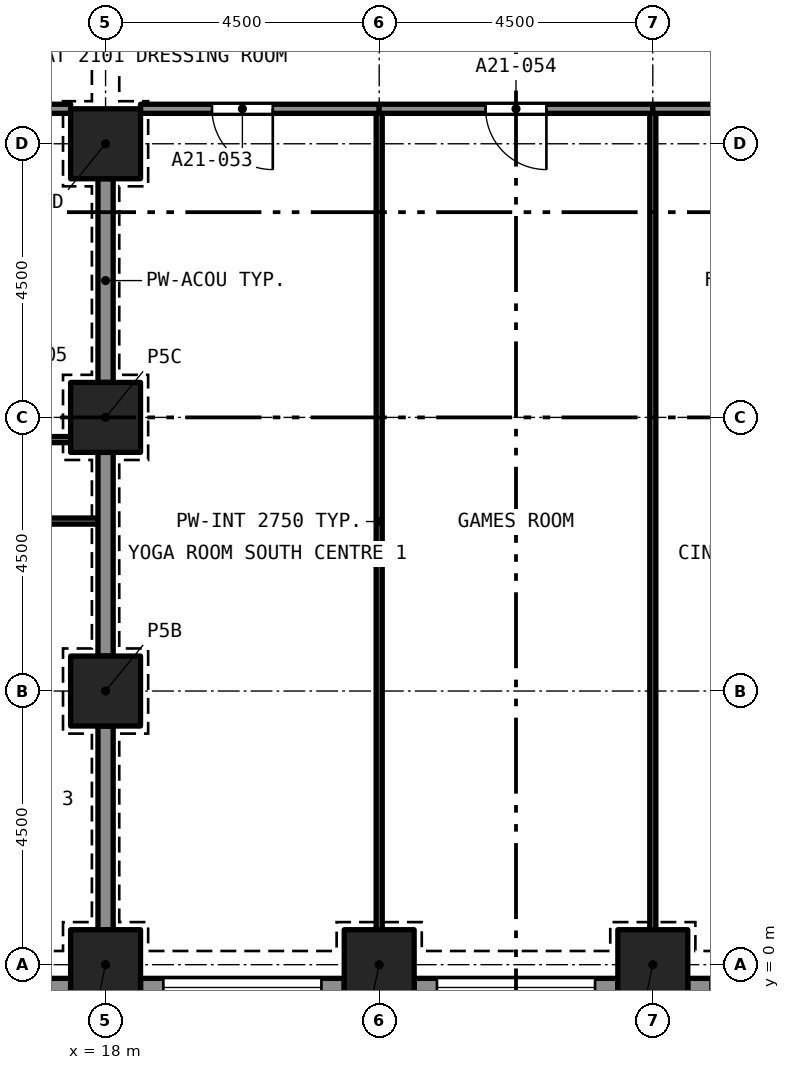
"""IFC4 building model, lengths in metres.
Left out: names, types, materials, properties, quantities, classifications, styles, units other than length and angle.
Written with IfcOpenShell. Run it as: python <this file> out.ifc"""

import sys

from ifc_helpers import new_model, si_unit, direction, frame, frame_2d, origin, origin_2d, place, context, subcontext, project, spatial, rectangle, extrude, element, fill, save


model = new_model("IFC4")
c1 = context("Model", 3, precision=1e-05, world=origin(), true_north=direction((0.0, 1.0)))
c2 = subcontext(c1, "Body", "Model", "MODEL_VIEW")
j1 = project(units=[si_unit("LENGTHUNIT", "METRE"), si_unit("PLANEANGLEUNIT", "RADIAN")], contexts=[c1])
p1 = place(None, origin())
s1 = spatial("IfcSite", under=j1, at=p1, CompositionType="ELEMENT")
p2 = place(p1, origin())
s2 = spatial("IfcBuilding", under=s1, at=p2, CompositionType="ELEMENT")
p3 = place(p2, frame((0.0, 0.0, 80.0)))
s3 = spatial("IfcBuildingStorey", under=s2, at=p3, CompositionType="ELEMENT", Elevation=80.0)
for number, where, z_axis, x_axis in (
    (1, (18.0, 0.0, 0.0), (0.0, 0.0, 1.0), (1.0, 0.0, 0.0)),
    (2, (22.5, 0.0, 0.0), (0.0, 0.0, 1.0), (1.0, 0.0, 0.0)),
    (3, (27.0, 0.0, 0.0), (0.0, 0.0, 1.0), (1.0, 0.0, 0.0)),
    (4, (18.0, 4.5, 0.0), (0.0, 0.0, 1.0), (1.0, 0.0, 0.0)),
    (5, (18.0, 9.0, 0.0), (0.0, 0.0, 1.0), (1.0, 0.0, 0.0)),
    (6, (18.0, 13.5, 0.0), (0.0, 0.0, 1.0), (1.0, 0.0, 0.0)),
):
    element("IfcColumn", number, at=place(p3, frame(where, z_axis=z_axis, x_axis=x_axis)), inside=s3, PredefinedType="COLUMN", context=c2, shape_type="SweptSolid", body=[
        extrude(rectangle(XDim=1.15, YDim=1.15, at=origin_2d()), origin(), (0.0, 0.0, 1.0), 3.2),
    ])
p4 = place(p3, frame((17.425, -0.375, 0.0), z_axis=(0.0, 0.0, 1.0), x_axis=(-1.0, 0.0, 0.0)))
e7 = element("IfcWall", 7, at=p4, inside=s3, PredefinedType="SOLIDWALL", context=c2, shape_type="SweptSolid", body=[
    extrude(rectangle(XDim=3.35, YDim=0.3, at=frame_2d((1.675, 0.0))), origin(), (0.0, 0.0, 1.0), 3.2),
])
p5 = place(p4, frame((0.375, 0.0, 0.45)))
e8 = element("IfcOpeningElement", 8, at=p5, cuts=e7, PredefinedType="OPENING", context=c2, shape_type="SweptSolid", body=[
    extrude(rectangle(XDim=2.6, YDim=1.95, at=frame_2d((1.3, 0.975))), frame((0.0, 0.16, 0.0), z_axis=(0.0, -1.0, 0.0), x_axis=(1.0, 0.0, 0.0)), (0.0, 0.0, 1.0), 0.32),
])
p6 = place(p3, frame((21.925, -0.375, 0.0), z_axis=(0.0, 0.0, 1.0), x_axis=(-1.0, 0.0, 0.0)))
e9 = element("IfcWall", 9, at=p6, inside=s3, PredefinedType="SOLIDWALL", context=c2, shape_type="SweptSolid", body=[
    extrude(rectangle(XDim=3.35, YDim=0.3, at=frame_2d((1.675, 0.0))), origin(), (0.0, 0.0, 1.0), 3.2),
])
p7 = place(p6, frame((0.375, 0.0, 0.45)))
e10 = element("IfcOpeningElement", 10, at=p7, cuts=e9, PredefinedType="OPENING", context=c2, shape_type="SweptSolid", body=[
    extrude(rectangle(XDim=2.6, YDim=1.95, at=frame_2d((1.3, 0.975))), frame((0.0, 0.16, 0.0), z_axis=(0.0, -1.0, 0.0), x_axis=(1.0, 0.0, 0.0)), (0.0, 0.0, 1.0), 0.32),
])
p8 = place(p3, frame((26.425, -0.375, 0.0), z_axis=(0.0, 0.0, 1.0), x_axis=(-1.0, 0.0, 0.0)))
e11 = element("IfcWall", 11, at=p8, inside=s3, PredefinedType="SOLIDWALL", context=c2, shape_type="SweptSolid", body=[
    extrude(rectangle(XDim=3.35, YDim=0.3, at=frame_2d((1.675, 0.0))), origin(), (0.0, 0.0, 1.0), 3.2),
])
p9 = place(p8, frame((0.375, 0.0, 0.45)))
e12 = element("IfcOpeningElement", 12, at=p9, cuts=e11, PredefinedType="OPENING", context=c2, shape_type="SweptSolid", body=[
    extrude(rectangle(XDim=2.6, YDim=1.95, at=frame_2d((1.3, 0.975))), frame((0.0, 0.16, 0.0), z_axis=(0.0, -1.0, 0.0), x_axis=(1.0, 0.0, 0.0)), (0.0, 0.0, 1.0), 0.32),
])
p10 = place(p3, frame((30.925, -0.375, 0.0), z_axis=(0.0, 0.0, 1.0), x_axis=(-1.0, 0.0, 0.0)))
e13 = element("IfcWall", 13, at=p10, inside=s3, PredefinedType="SOLIDWALL", context=c2, shape_type="SweptSolid", body=[
    extrude(rectangle(XDim=3.35, YDim=0.3, at=frame_2d((1.675, 0.0))), origin(), (0.0, 0.0, 1.0), 3.2),
])
p11 = place(p10, frame((0.375, 0.0, 0.45)))
e14 = element("IfcOpeningElement", 14, at=p11, cuts=e13, PredefinedType="OPENING", context=c2, shape_type="SweptSolid", body=[
    extrude(rectangle(XDim=2.6, YDim=1.95, at=frame_2d((1.3, 0.975))), frame((0.0, 0.16, 0.0), z_axis=(0.0, -1.0, 0.0), x_axis=(1.0, 0.0, 0.0)), (0.0, 0.0, 1.0), 0.32),
])
p12 = place(p3, frame((11.85, 14.075, 0.0), z_axis=(0.0, 0.0, 1.0), x_axis=(1.0, 0.0, 0.0)))
e15 = element("IfcWall", 15, at=p12, inside=s3, PredefinedType="PARTITIONING", context=c2, shape_type="SweptSolid", body=[
    extrude(rectangle(XDim=5.575, YDim=0.15, at=frame_2d((2.788, 0.0))), origin(), (0.0, 0.0, 1.0), 2.9),
])
p13 = place(p3, frame((17.875, 7.295, 0.0), z_axis=(0.0, 0.0, 1.0), x_axis=(-1.0, 0.0, 0.0)))
e16 = element("IfcWall", 16, at=p13, inside=s3, PredefinedType="PARTITIONING", context=c2, shape_type="SweptSolid", body=[
    extrude(rectangle(XDim=4.375, YDim=0.1, at=frame_2d((2.188, 0.0))), origin(), (0.0, 0.0, 1.0), 2.9),
])
p14 = place(p13, frame((1.675, 0.0, 0.0)))
e17 = element("IfcOpeningElement", 17, at=p14, cuts=e16, PredefinedType="OPENING", context=c2, shape_type="SweptSolid", body=[
    extrude(rectangle(XDim=0.9, YDim=2.1, at=frame_2d((0.45, 1.05))), frame((0.0, 0.06, 0.0), z_axis=(0.0, -1.0, 0.0), x_axis=(1.0, 0.0, 0.0)), (0.0, 0.0, 1.0), 0.12),
])
for number, where, z_axis, x_axis in (
    (18, (18.0, 5.075, 0.0), (0.0, 0.0, 1.0), (0.0, 1.0, 0.0)),
    (19, (18.0, 0.575, 0.0), (0.0, 0.0, 1.0), (0.0, 1.0, 0.0)),
):
    element("IfcWall", number, at=place(p3, frame(where, z_axis=z_axis, x_axis=x_axis)), inside=s3, PredefinedType="PARTITIONING", context=c2, shape_type="SweptSolid", body=[
        extrude(rectangle(XDim=3.35, YDim=0.25, at=frame_2d((1.675, 0.0))), origin(), (0.0, 0.0, 1.0), 2.38),
    ])
p15 = place(p3, frame((15.402, 8.635, 0.0), z_axis=(0.0, 0.0, 1.0), x_axis=(1.0, 0.0, 0.0)))
e20 = element("IfcWall", 20, at=p15, inside=s3, PredefinedType="PARTITIONING", context=c2, shape_type="SweptSolid", body=[
    extrude(rectangle(XDim=2.023, YDim=0.1, at=frame_2d((1.012, 0.0))), origin(), (0.0, 0.0, 1.0), 2.9),
])
p16 = place(p15, frame((0.899, 0.0, 0.0)))
e21 = element("IfcOpeningElement", 21, at=p16, cuts=e20, PredefinedType="OPENING", context=c2, shape_type="SweptSolid", body=[
    extrude(rectangle(XDim=0.8, YDim=2.1, at=frame_2d((0.4, 1.05))), frame((0.0, 0.06, 0.0), z_axis=(0.0, -1.0, 0.0), x_axis=(1.0, 0.0, 0.0)), (0.0, 0.0, 1.0), 0.12),
])
p17 = place(p3, frame((18.0, 9.575, 0.0), z_axis=(0.0, 0.0, 1.0), x_axis=(0.0, 1.0, 0.0)))
e22 = element("IfcWall", 22, at=p17, inside=s3, PredefinedType="PARTITIONING", context=c2, shape_type="SweptSolid", body=[
    extrude(rectangle(XDim=3.35, YDim=0.25, at=frame_2d((1.675, 0.0))), origin(), (0.0, 0.0, 1.0), 2.38),
])
p18 = place(p3, frame((22.5, 0.575, 0.0), z_axis=(0.0, 0.0, 1.0), x_axis=(0.0, 1.0, 0.0)))
e23 = element("IfcWall", 23, at=p18, inside=s3, PredefinedType="PARTITIONING", context=c2, shape_type="SweptSolid", body=[
    extrude(rectangle(XDim=13.425, YDim=0.1, at=frame_2d((6.712, 0.0))), origin(), (0.0, 0.0, 1.0), 2.75),
])
p19 = place(p3, frame((22.5, 14.075, 0.0), z_axis=(0.0, 0.0, 1.0), x_axis=(-1.0, 0.0, 0.0)))
e24 = element("IfcWall", 24, at=p19, inside=s3, PredefinedType="PARTITIONING", context=c2, shape_type="SweptSolid", body=[
    extrude(rectangle(XDim=3.925, YDim=0.15, at=frame_2d((1.962, 0.0))), origin(), (0.0, 0.0, 1.0), 2.75),
])
p20 = place(p19, frame((1.75, 0.0, 0.0)))
e25 = element("IfcOpeningElement", 25, at=p20, cuts=e24, PredefinedType="OPENING", context=c2, shape_type="SweptSolid", body=[
    extrude(rectangle(XDim=1.0, YDim=2.1, at=frame_2d((0.5, 1.05))), frame((0.0, 0.085, 0.0), z_axis=(0.0, -1.0, 0.0), x_axis=(1.0, 0.0, 0.0)), (0.0, 0.0, 1.0), 0.17),
])
p21 = place(p3, frame((27.0, 0.575, 0.0), z_axis=(0.0, 0.0, 1.0), x_axis=(0.0, 1.0, 0.0)))
e26 = element("IfcWall", 26, at=p21, inside=s3, PredefinedType="PARTITIONING", context=c2, shape_type="SweptSolid", body=[
    extrude(rectangle(XDim=13.425, YDim=0.1, at=frame_2d((6.712, 0.0))), origin(), (0.0, 0.0, 1.0), 2.75),
])
p22 = place(p3, frame((27.0, 14.075, 0.0), z_axis=(0.0, 0.0, 1.0), x_axis=(-1.0, 0.0, 0.0)))
e27 = element("IfcWall", 27, at=p22, inside=s3, PredefinedType="PARTITIONING", context=c2, shape_type="SweptSolid", body=[
    extrude(rectangle(XDim=4.5, YDim=0.15, at=frame_2d((2.25, 0.0))), origin(), (0.0, 0.0, 1.0), 2.75),
])
p23 = place(p22, frame((1.75, 0.0, 0.0)))
e28 = element("IfcOpeningElement", 28, at=p23, cuts=e27, PredefinedType="OPENING", context=c2, shape_type="SweptSolid", body=[
    extrude(rectangle(XDim=1.0, YDim=2.1, at=frame_2d((0.5, 1.05))), frame((0.0, 0.085, 0.0), z_axis=(0.0, -1.0, 0.0), x_axis=(1.0, 0.0, 0.0)), (0.0, 0.0, 1.0), 0.17),
])
p24 = place(p3, frame((30.925, 14.075, 0.0), z_axis=(0.0, 0.0, 1.0), x_axis=(-1.0, 0.0, 0.0)))
e29 = element("IfcWall", 29, at=p24, inside=s3, PredefinedType="PARTITIONING", context=c2, shape_type="SweptSolid", body=[
    extrude(rectangle(XDim=3.925, YDim=0.15, at=frame_2d((1.962, 0.0))), origin(), (0.0, 0.0, 1.0), 2.75),
])
p25 = place(p24, frame((1.175, 0.0, 0.0)))
e30 = element("IfcOpeningElement", 30, at=p25, cuts=e29, PredefinedType="OPENING", context=c2, shape_type="SweptSolid", body=[
    extrude(rectangle(XDim=1.0, YDim=2.1, at=frame_2d((0.5, 1.05))), frame((0.0, 0.085, 0.0), z_axis=(0.0, -1.0, 0.0), x_axis=(1.0, 0.0, 0.0)), (0.0, 0.0, 1.0), 0.17),
])
p26 = place(p7, origin())
e31 = element("IfcWindow", 31, at=p26, inside=s3, PartitioningType="SINGLE_PANEL", PredefinedType="WINDOW", context=c2, shape_type="SweptSolid", body=[
    extrude(rectangle(XDim=2.6, YDim=1.95, at=frame_2d((1.3, 0.975))), frame((0.0, 0.03, 0.0), z_axis=(0.0, -1.0, 0.0), x_axis=(1.0, 0.0, 0.0)), (0.0, 0.0, 1.0), 0.06),
])
fill(e10, e31)
p27 = place(p9, origin())
e32 = element("IfcWindow", 32, at=p27, inside=s3, PartitioningType="SINGLE_PANEL", PredefinedType="WINDOW", context=c2, shape_type="SweptSolid", body=[
    extrude(rectangle(XDim=2.6, YDim=1.95, at=frame_2d((1.3, 0.975))), frame((0.0, 0.03, 0.0), z_axis=(0.0, -1.0, 0.0), x_axis=(1.0, 0.0, 0.0)), (0.0, 0.0, 1.0), 0.06),
])
fill(e12, e32)
p28 = place(p20, origin())
e33 = element("IfcDoor", 33, at=p28, inside=s3, OperationType="SINGLE_SWING_RIGHT", PredefinedType="DOOR", context=c2, shape_type="SweptSolid", body=[
    extrude(rectangle(XDim=1.0, YDim=2.1, at=frame_2d((0.5, 1.05))), frame((0.0, 0.025, 0.0), z_axis=(0.0, -1.0, 0.0), x_axis=(1.0, 0.0, 0.0)), (0.0, 0.0, 1.0), 0.05),
])
fill(e25, e33)
p29 = place(p23, origin())
e34 = element("IfcDoor", 34, at=p29, inside=s3, OperationType="SINGLE_SWING_RIGHT", PredefinedType="DOOR", context=c2, shape_type="SweptSolid", body=[
    extrude(rectangle(XDim=1.0, YDim=2.1, at=frame_2d((0.5, 1.05))), frame((0.0, 0.025, 0.0), z_axis=(0.0, -1.0, 0.0), x_axis=(1.0, 0.0, 0.0)), (0.0, 0.0, 1.0), 0.05),
])
fill(e28, e34)
save(model, sys.argv[1])
